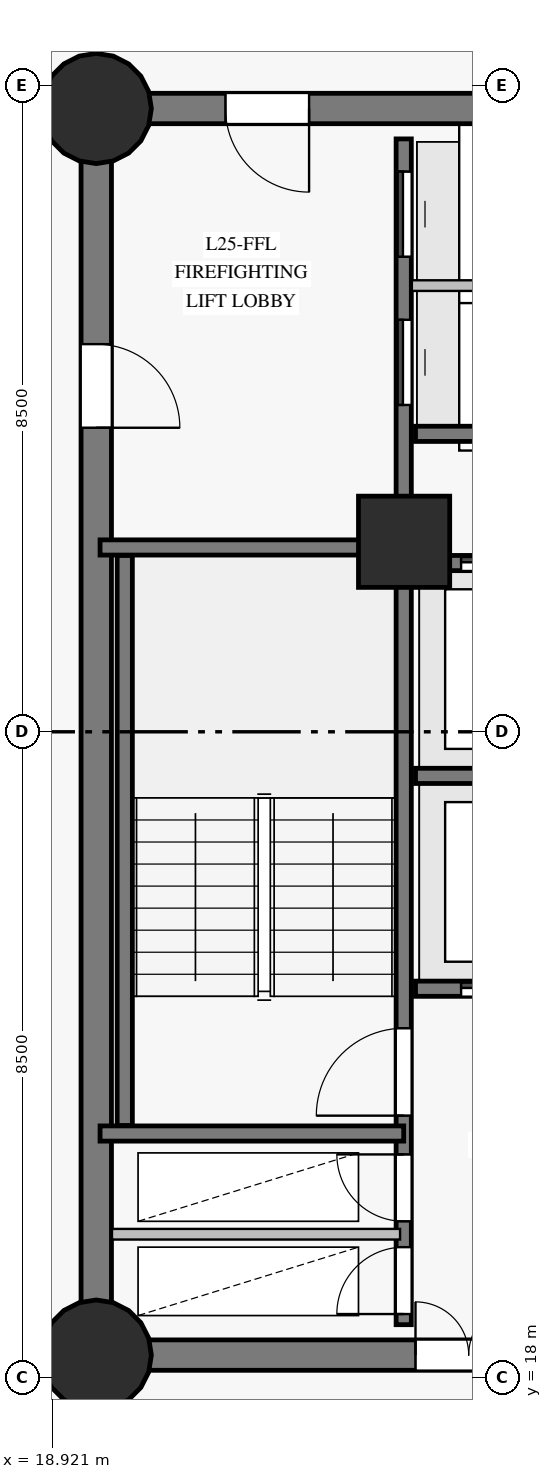
"""IFC4 building model, lengths in metres.
Left out: names, types, materials, properties, quantities, classifications, styles, units other than length and angle.
Written with IfcOpenShell. Run it as: python <this file> out.ifc"""

import sys

from ifc_helpers import new_model, si_unit, direction, frame, frame_2d, origin, origin_with_axes, origin_2d, place, context, subcontext, project, spatial, rectangle, circle, extrude, source, transform, mapped, element, fill, save


model = new_model("IFC4")
c1 = context("Model", 3, precision=1e-05, world=origin(), true_north=direction((0.0, 1.0)))
c2 = subcontext(c1, "Body", "Model", "MODEL_VIEW")
j1 = project(units=[si_unit("LENGTHUNIT", "METRE"), si_unit("PLANEANGLEUNIT", "RADIAN")], contexts=[c1])
p1 = place(None, origin())
s1 = spatial("IfcSite", under=j1, at=p1, CompositionType="ELEMENT")
p2 = place(p1, origin())
s2 = spatial("IfcBuilding", under=s1, at=p2, CompositionType="ELEMENT")
p3 = place(p2, frame((0.0, 0.0, 96.2)))
s3 = spatial("IfcBuildingStorey", under=s2, at=p3, CompositionType="ELEMENT", Elevation=96.2)
p4 = place(p3, frame((19.5, 18.3, 0.0), z_axis=(0.0, 0.0, 1.0), x_axis=(1.0, 0.0, 0.0)))
e1 = element("IfcWall", 1, at=p4, inside=s3, PredefinedType="SHEAR", context=c2, shape_type="SweptSolid", body=[
    extrude(rectangle(XDim=7.05, YDim=0.4, at=frame_2d((3.525, 0.0))), origin(), (0.0, 0.0, 1.0), 2.825),
])
p5 = place(p4, frame((4.2, 0.0, 0.0)))
e2 = element("IfcOpeningElement", 2, at=p5, cuts=e1, PredefinedType="OPENING", context=c2, shape_type="SweptSolid", body=[
    extrude(rectangle(XDim=1.4, YDim=2.2, at=frame_2d((0.7, 1.1))), frame((0.0, 0.21, 0.0), z_axis=(0.0, -1.0, 0.0), x_axis=(1.0, 0.0, 0.0)), (0.0, 0.0, 1.0), 0.42),
])
p6 = place(p3, frame((26.55, 34.7, 0.0), z_axis=(0.0, 0.0, 1.0), x_axis=(-1.0, 0.0, 0.0)))
e3 = element("IfcWall", 3, at=p6, inside=s3, PredefinedType="SHEAR", context=c2, shape_type="SweptSolid", body=[
    extrude(rectangle(XDim=7.05, YDim=0.4, at=frame_2d((3.525, 0.0))), origin(), (0.0, 0.0, 1.0), 2.825),
])
p7 = place(p6, frame((4.25, 0.0, 0.0)))
e4 = element("IfcOpeningElement", 4, at=p7, cuts=e3, PredefinedType="OPENING", context=c2, shape_type="SweptSolid", body=[
    extrude(rectangle(XDim=1.1, YDim=2.15, at=frame_2d((0.55, 1.075))), frame((0.0, 0.21, 0.0), z_axis=(0.0, -1.0, 0.0), x_axis=(1.0, 0.0, 0.0)), (0.0, 0.0, 1.0), 0.42),
])
p8 = place(p3, frame((19.5, 34.7, 0.0), z_axis=(0.0, 0.0, 1.0), x_axis=(0.0, -1.0, 0.0)))
e5 = element("IfcWall", 5, at=p8, inside=s3, PredefinedType="SHEAR", context=c2, shape_type="SweptSolid", body=[
    extrude(rectangle(XDim=16.4, YDim=0.4, at=frame_2d((8.2, 0.0))), origin(), (0.0, 0.0, 1.0), 2.825),
])
p9 = place(p8, frame((3.1, 0.0, 0.0)))
e6 = element("IfcOpeningElement", 6, at=p9, cuts=e5, PredefinedType="OPENING", context=c2, shape_type="SweptSolid", body=[
    extrude(rectangle(XDim=1.1, YDim=2.15, at=frame_2d((0.55, 1.075))), frame((0.0, 0.21, 0.0), z_axis=(0.0, -1.0, 0.0), x_axis=(1.0, 0.0, 0.0)), (0.0, 0.0, 1.0), 0.42),
])
m1 = source(origin_with_axes(), c2, "Body", "SweptSolid", [
    extrude(circle(Radius=0.725, at=origin_2d()), origin(), (0.0, 0.0, 1.0), 3.05),
])
for number, where, z_axis, x_axis in (
    (7, (19.5, 18.3, 0.0), (0.0, 0.0, 1.0), (1.0, 0.0, 0.0)),
    (8, (19.5, 34.7, 0.0), (0.0, 0.0, 1.0), (1.0, 0.0, 0.0)),
):
    element("IfcColumn", number, at=place(p3, frame(where, z_axis=z_axis, x_axis=x_axis)), inside=s3, PredefinedType="COLUMN", context=c2, shape_type="MappedRepresentation", body=[
        mapped(m1, transform((0.0, 0.0, 0.0), scale=1.0)),
    ])
m2 = source(origin_with_axes(), c2, "Body", "SweptSolid", [
    extrude(rectangle(XDim=1.2, YDim=1.2, at=origin_2d()), origin(), (0.0, 0.0, 1.0), 3.05),
])
p10 = place(p3, frame((23.55, 29.0, 0.0), z_axis=(0.0, 0.0, 1.0), x_axis=(1.0, 0.0, 0.0)))
e9 = element("IfcColumn", 9, at=p10, inside=s3, PredefinedType="COLUMN", context=c2, shape_type="MappedRepresentation", body=[
    mapped(m2, transform((0.0, 0.0, 0.0), scale=1.0)),
])
p11 = place(p3, frame((21.66, 46.74, 0.0), z_axis=(0.0, 0.0, 1.0), x_axis=(-0.603487207486, -0.797372679743, 0.0)))
e10 = element("IfcWall", 10, at=p11, inside=s3, PredefinedType="SOLIDWALL", context=c2, shape_type="SweptSolid", body=[
    extrude(rectangle(XDim=24.022, YDim=0.32, at=frame_2d((12.011, 0.0))), origin(), (0.0, 0.0, 1.0), 2.825),
])
p12 = place(p11, frame((1.101, 0.0, 0.85)))
e11 = element("IfcOpeningElement", 11, at=p12, cuts=e10, PredefinedType="OPENING", context=c2, shape_type="SweptSolid", body=[
    extrude(rectangle(XDim=1.65, YDim=1.65, at=frame_2d((0.825, 0.825))), frame((0.0, 0.17, 0.0), z_axis=(0.0, -1.0, 0.0), x_axis=(1.0, 0.0, 0.0)), (0.0, 0.0, 1.0), 0.34),
])
p13 = place(p11, frame((5.462, 0.0, 0.85)))
e12 = element("IfcOpeningElement", 12, at=p13, cuts=e10, PredefinedType="OPENING", context=c2, shape_type="SweptSolid", body=[
    extrude(rectangle(XDim=1.65, YDim=1.65, at=frame_2d((0.825, 0.825))), frame((0.0, 0.17, 0.0), z_axis=(0.0, -1.0, 0.0), x_axis=(1.0, 0.0, 0.0)), (0.0, 0.0, 1.0), 0.34),
])
p14 = place(p11, frame((15.427, 0.0, 0.85)))
e13 = element("IfcOpeningElement", 13, at=p14, cuts=e10, PredefinedType="OPENING", context=c2, shape_type="SweptSolid", body=[
    extrude(rectangle(XDim=1.65, YDim=1.65, at=frame_2d((0.825, 0.825))), frame((0.0, 0.17, 0.0), z_axis=(0.0, -1.0, 0.0), x_axis=(1.0, 0.0, 0.0)), (0.0, 0.0, 1.0), 0.34),
])
p15 = place(p11, frame((21.495, 0.0, 0.0)))
e14 = element("IfcOpeningElement", 14, at=p15, cuts=e10, PredefinedType="OPENING", context=c2, shape_type="SweptSolid", body=[
    extrude(rectangle(XDim=1.05, YDim=2.12, at=frame_2d((0.525, 1.06))), frame((0.0, 0.17, 0.0), z_axis=(0.0, -1.0, 0.0), x_axis=(1.0, 0.0, 0.0)), (0.0, 0.0, 1.0), 0.34),
])
p16 = place(p3, frame((23.545, 18.7, 0.0), z_axis=(0.0, 0.0, 1.0), x_axis=(0.0, 1.0, 0.0)))
e15 = element("IfcWall", 15, at=p16, inside=s3, PredefinedType="SHEAR", context=c2, shape_type="SweptSolid", body=[
    extrude(rectangle(XDim=15.6, YDim=0.2, at=frame_2d((7.8, 0.0))), origin(), (0.0, 0.0, 1.0), 2.825),
])
p17 = place(p16, frame((2.75, 0.0, 0.0)))
e16 = element("IfcOpeningElement", 16, at=p17, cuts=e15, PredefinedType="OPENING", context=c2, shape_type="SweptSolid", body=[
    extrude(rectangle(XDim=1.15, YDim=2.15, at=frame_2d((0.575, 1.075))), frame((0.0, 0.11, 0.0), z_axis=(0.0, -1.0, 0.0), x_axis=(1.0, 0.0, 0.0)), (0.0, 0.0, 1.0), 0.22),
])
p18 = place(p16, frame((0.14, 0.0, 0.0)))
e17 = element("IfcOpeningElement", 17, at=p18, cuts=e15, PredefinedType="OPENING", context=c2, shape_type="SweptSolid", body=[
    extrude(rectangle(XDim=0.88, YDim=2.1, at=frame_2d((0.44, 1.05))), frame((0.0, 0.11, 0.0), z_axis=(0.0, -1.0, 0.0), x_axis=(1.0, 0.0, 0.0)), (0.0, 0.0, 1.0), 0.22),
])
p19 = place(p16, frame((1.36, 0.0, 0.0)))
e18 = element("IfcOpeningElement", 18, at=p19, cuts=e15, PredefinedType="OPENING", context=c2, shape_type="SweptSolid", body=[
    extrude(rectangle(XDim=0.88, YDim=2.1, at=frame_2d((0.44, 1.05))), frame((0.0, 0.11, 0.0), z_axis=(0.0, -1.0, 0.0), x_axis=(1.0, 0.0, 0.0)), (0.0, 0.0, 1.0), 0.22),
])
p20 = place(p16, frame((12.1, 0.0, 0.0)))
e19 = element("IfcOpeningElement", 19, at=p20, cuts=e15, PredefinedType="OPENING", context=c2, shape_type="SweptSolid", body=[
    extrude(rectangle(XDim=1.12, YDim=2.15, at=frame_2d((0.56, 1.075))), frame((0.0, 0.11, 0.0), z_axis=(0.0, -1.0, 0.0), x_axis=(1.0, 0.0, 0.0)), (0.0, 0.0, 1.0), 0.22),
])
p21 = place(p16, frame((14.05, 0.0, 0.0)))
e20 = element("IfcOpeningElement", 20, at=p21, cuts=e15, PredefinedType="OPENING", context=c2, shape_type="SweptSolid", body=[
    extrude(rectangle(XDim=1.12, YDim=2.15, at=frame_2d((0.56, 1.075))), frame((0.0, 0.11, 0.0), z_axis=(0.0, -1.0, 0.0), x_axis=(1.0, 0.0, 0.0)), (0.0, 0.0, 1.0), 0.22),
])
p22 = place(p3, frame((23.7, 23.12, 0.0), z_axis=(0.0, 0.0, 1.0), x_axis=(1.0, 0.0, 0.0)))
e21 = element("IfcWall", 21, at=p22, inside=s3, PredefinedType="SHEAR", context=c2, shape_type="SweptSolid", body=[
    extrude(rectangle(XDim=9.6, YDim=0.2, at=frame_2d((4.8, 0.0))), origin(), (0.0, 0.0, 1.0), 2.825),
])
p23 = place(p22, frame((0.6, 0.0, 0.0)))
e22 = element("IfcOpeningElement", 22, at=p23, cuts=e21, PredefinedType="OPENING", context=c2, shape_type="SweptSolid", body=[
    extrude(rectangle(XDim=1.1, YDim=2.15, at=frame_2d((0.55, 1.075))), frame((0.0, 0.11, 0.0), z_axis=(0.0, -1.0, 0.0), x_axis=(1.0, 0.0, 0.0)), (0.0, 0.0, 1.0), 0.22),
])
p24 = place(p22, frame((2.98, 0.0, 0.0)))
e23 = element("IfcOpeningElement", 23, at=p24, cuts=e21, PredefinedType="OPENING", context=c2, shape_type="SweptSolid", body=[
    extrude(rectangle(XDim=1.1, YDim=2.15, at=frame_2d((0.55, 1.075))), frame((0.0, 0.11, 0.0), z_axis=(0.0, -1.0, 0.0), x_axis=(1.0, 0.0, 0.0)), (0.0, 0.0, 1.0), 0.22),
])
p25 = place(p22, frame((5.36, 0.0, 0.0)))
e24 = element("IfcOpeningElement", 24, at=p25, cuts=e21, PredefinedType="OPENING", context=c2, shape_type="SweptSolid", body=[
    extrude(rectangle(XDim=1.1, YDim=2.15, at=frame_2d((0.55, 1.075))), frame((0.0, 0.11, 0.0), z_axis=(0.0, -1.0, 0.0), x_axis=(1.0, 0.0, 0.0)), (0.0, 0.0, 1.0), 0.22),
])
p26 = place(p22, frame((7.74, 0.0, 0.0)))
e25 = element("IfcOpeningElement", 25, at=p26, cuts=e21, PredefinedType="OPENING", context=c2, shape_type="SweptSolid", body=[
    extrude(rectangle(XDim=1.1, YDim=2.15, at=frame_2d((0.55, 1.075))), frame((0.0, 0.11, 0.0), z_axis=(0.0, -1.0, 0.0), x_axis=(1.0, 0.0, 0.0)), (0.0, 0.0, 1.0), 0.22),
])
p27 = place(p3, frame((23.7, 25.92, 0.0), z_axis=(0.0, 0.0, 1.0), x_axis=(1.0, 0.0, 0.0)))
e26 = element("IfcWall", 26, at=p27, inside=s3, PredefinedType="SHEAR", context=c2, shape_type="SweptSolid", body=[
    extrude(rectangle(XDim=9.6, YDim=0.2, at=frame_2d((4.8, 0.0))), origin(), (0.0, 0.0, 1.0), 2.825),
])
p28 = place(p3, frame((23.7, 28.72, 0.0), z_axis=(0.0, 0.0, 1.0), x_axis=(1.0, 0.0, 0.0)))
e27 = element("IfcWall", 27, at=p28, inside=s3, PredefinedType="SHEAR", context=c2, shape_type="SweptSolid", body=[
    extrude(rectangle(XDim=9.6, YDim=0.2, at=frame_2d((4.8, 0.0))), origin(), (0.0, 0.0, 1.0), 2.825),
])
p29 = place(p28, frame((0.6, 0.0, 0.0)))
e28 = element("IfcOpeningElement", 28, at=p29, cuts=e27, PredefinedType="OPENING", context=c2, shape_type="SweptSolid", body=[
    extrude(rectangle(XDim=1.1, YDim=2.15, at=frame_2d((0.55, 1.075))), frame((0.0, 0.11, 0.0), z_axis=(0.0, -1.0, 0.0), x_axis=(1.0, 0.0, 0.0)), (0.0, 0.0, 1.0), 0.22),
])
p30 = place(p28, frame((2.98, 0.0, 0.0)))
e29 = element("IfcOpeningElement", 29, at=p30, cuts=e27, PredefinedType="OPENING", context=c2, shape_type="SweptSolid", body=[
    extrude(rectangle(XDim=1.1, YDim=2.15, at=frame_2d((0.55, 1.075))), frame((0.0, 0.11, 0.0), z_axis=(0.0, -1.0, 0.0), x_axis=(1.0, 0.0, 0.0)), (0.0, 0.0, 1.0), 0.22),
])
p31 = place(p28, frame((5.36, 0.0, 0.0)))
e30 = element("IfcOpeningElement", 30, at=p31, cuts=e27, PredefinedType="OPENING", context=c2, shape_type="SweptSolid", body=[
    extrude(rectangle(XDim=1.1, YDim=2.15, at=frame_2d((0.55, 1.075))), frame((0.0, 0.11, 0.0), z_axis=(0.0, -1.0, 0.0), x_axis=(1.0, 0.0, 0.0)), (0.0, 0.0, 1.0), 0.22),
])
p32 = place(p28, frame((7.74, 0.0, 0.0)))
e31 = element("IfcOpeningElement", 31, at=p32, cuts=e27, PredefinedType="OPENING", context=c2, shape_type="SweptSolid", body=[
    extrude(rectangle(XDim=1.1, YDim=2.15, at=frame_2d((0.55, 1.075))), frame((0.0, 0.11, 0.0), z_axis=(0.0, -1.0, 0.0), x_axis=(1.0, 0.0, 0.0)), (0.0, 0.0, 1.0), 0.22),
])
p33 = place(p3, frame((19.875, 21.32, 0.0), z_axis=(0.0, 0.0, 1.0), x_axis=(0.0, 1.0, 0.0)))
e32 = element("IfcWall", 32, at=p33, inside=s3, PredefinedType="SHEAR", context=c2, shape_type="SweptSolid", body=[
    extrude(rectangle(XDim=7.5, YDim=0.2, at=frame_2d((3.75, 0.0))), origin(), (0.0, 0.0, 1.0), 2.825),
])
for number, where, z_axis, x_axis in (
    (33, (19.55, 21.215, 0.0), (0.0, 0.0, 1.0), (1.0, 0.0, 0.0)),
    (34, (19.55, 28.925, 0.0), (0.0, 0.0, 1.0), (1.0, 0.0, 0.0)),
):
    element("IfcWall", number, at=place(p3, frame(where, z_axis=z_axis, x_axis=x_axis)), inside=s3, PredefinedType="SHEAR", context=c2, shape_type="SweptSolid", body=[
        extrude(rectangle(XDim=3.995, YDim=0.2, at=frame_2d((1.998, 0.0))), origin(), (0.0, 0.0, 1.0), 2.825),
    ])
p34 = place(p3, frame((23.7, 30.42, 0.0), z_axis=(0.0, 0.0, 1.0), x_axis=(1.0, 0.0, 0.0)))
e35 = element("IfcWall", 35, at=p34, inside=s3, PredefinedType="SHEAR", context=c2, shape_type="SweptSolid", body=[
    extrude(rectangle(XDim=2.78, YDim=0.2, at=frame_2d((1.39, 0.0))), origin(), (0.0, 0.0, 1.0), 2.825),
])
p35 = place(p3, frame((19.707, 19.89, 0.0), z_axis=(0.0, 0.0, 1.0), x_axis=(1.0, 0.0, 0.0)))
e36 = element("IfcWall", 36, at=p35, inside=s3, PredefinedType="PARTITIONING", context=c2, shape_type="SweptSolid", body=[
    extrude(rectangle(XDim=3.79, YDim=0.14, at=frame_2d((1.895, 0.0))), origin(), (0.0, 0.0, 1.0), 2.825),
])
p36 = place(p3, frame((23.652, 32.37, 0.0), z_axis=(0.0, 0.0, 1.0), x_axis=(1.0, 0.0, 0.0)))
e37 = element("IfcWall", 37, at=p36, inside=s3, PredefinedType="PARTITIONING", context=c2, shape_type="SweptSolid", body=[
    extrude(rectangle(XDim=2.828, YDim=0.14, at=frame_2d((1.414, 0.0))), origin(), (0.0, 0.0, 1.0), 2.825),
])
m3 = source(origin_with_axes(), c2, "Body", "SweptSolid", [
    extrude(rectangle(XDim=1.15, YDim=2.15, at=frame_2d((0.575, 1.075))), frame((0.0, 0.025, 0.0), z_axis=(0.0, -1.0, 0.0), x_axis=(1.0, 0.0, 0.0)), (0.0, 0.0, 1.0), 0.05),
])
p37 = place(p17, origin())
e38 = element("IfcDoor", 38, at=p37, inside=s3, OperationType="SINGLE_SWING_LEFT", PredefinedType="DOOR", context=c2, shape_type="MappedRepresentation", body=[
    mapped(m3, transform((0.0, 0.0, 0.0), scale=1.0)),
])
fill(e16, e38)
m4 = source(origin_with_axes(), c2, "Body", "SweptSolid", [
    extrude(rectangle(XDim=1.1, YDim=2.15, at=frame_2d((0.55, 1.075))), frame((0.0, 0.025, 0.0), z_axis=(0.0, -1.0, 0.0), x_axis=(1.0, 0.0, 0.0)), (0.0, 0.0, 1.0), 0.05),
])
p38 = place(p7, origin())
e39 = element("IfcDoor", 39, at=p38, inside=s3, OperationType="SINGLE_SWING_LEFT", PredefinedType="DOOR", context=c2, shape_type="MappedRepresentation", body=[
    mapped(m4, transform((0.0, 0.0, 0.0), scale=1.0)),
])
fill(e4, e39)
p39 = place(p9, origin())
e40 = element("IfcDoor", 40, at=p39, inside=s3, OperationType="SINGLE_SWING_RIGHT", PredefinedType="DOOR", context=c2, shape_type="MappedRepresentation", body=[
    mapped(m4, transform((0.0, 0.0, 0.0), scale=1.0)),
])
fill(e6, e40)
m5 = source(origin_with_axes(), c2, "Body", "SweptSolid", [
    extrude(rectangle(XDim=0.88, YDim=2.1, at=frame_2d((0.44, 1.05))), frame((0.0, 0.025, 0.0), z_axis=(0.0, -1.0, 0.0), x_axis=(1.0, 0.0, 0.0)), (0.0, 0.0, 1.0), 0.05),
])
p40 = place(p18, origin())
e41 = element("IfcDoor", 41, at=p40, inside=s3, OperationType="SINGLE_SWING_LEFT", PredefinedType="DOOR", context=c2, shape_type="MappedRepresentation", body=[
    mapped(m5, transform((0.0, 0.0, 0.0), scale=1.0)),
])
fill(e17, e41)
p41 = place(p19, origin())
e42 = element("IfcDoor", 42, at=p41, inside=s3, OperationType="SINGLE_SWING_RIGHT", PredefinedType="DOOR", context=c2, shape_type="MappedRepresentation", body=[
    mapped(m5, transform((0.0, 0.0, 0.0), scale=1.0)),
])
fill(e18, e42)
m6 = source(origin_with_axes(), c2, "Body", "SweptSolid", [
    extrude(rectangle(XDim=1.4, YDim=2.2, at=frame_2d((0.7, 1.1))), frame((0.0, 0.025, 0.0), z_axis=(0.0, -1.0, 0.0), x_axis=(1.0, 0.0, 0.0)), (0.0, 0.0, 1.0), 0.05),
])
p42 = place(p5, origin())
e43 = element("IfcDoor", 43, at=p42, inside=s3, OperationType="DOUBLE_DOOR_SINGLE_SWING", PredefinedType="DOOR", context=c2, shape_type="MappedRepresentation", body=[
    mapped(m6, transform((0.0, 0.0, 0.0), scale=1.0)),
])
fill(e2, e43)
p43 = place(p23, origin())
e44 = element("IfcDoor", 44, at=p43, inside=s3, OperationType="SLIDING_TO_LEFT", PredefinedType="DOOR", context=c2, shape_type="MappedRepresentation", body=[
    mapped(m4, transform((0.0, 0.0, 0.0), scale=1.0)),
])
fill(e22, e44)
p44 = place(p29, origin())
e45 = element("IfcDoor", 45, at=p44, inside=s3, OperationType="SLIDING_TO_LEFT", PredefinedType="DOOR", context=c2, shape_type="MappedRepresentation", body=[
    mapped(m4, transform((0.0, 0.0, 0.0), scale=1.0)),
])
fill(e28, e45)
m7 = source(origin_with_axes(), c2, "Body", "SweptSolid", [
    extrude(rectangle(XDim=1.12, YDim=2.15, at=frame_2d((0.56, 1.075))), frame((0.0, 0.025, 0.0), z_axis=(0.0, -1.0, 0.0), x_axis=(1.0, 0.0, 0.0)), (0.0, 0.0, 1.0), 0.05),
])
p45 = place(p20, origin())
e46 = element("IfcDoor", 46, at=p45, inside=s3, OperationType="SLIDING_TO_LEFT", PredefinedType="DOOR", context=c2, shape_type="MappedRepresentation", body=[
    mapped(m7, transform((0.0, 0.0, 0.0), scale=1.0)),
])
fill(e19, e46)
p46 = place(p21, origin())
e47 = element("IfcDoor", 47, at=p46, inside=s3, OperationType="SLIDING_TO_RIGHT", PredefinedType="DOOR", context=c2, shape_type="MappedRepresentation", body=[
    mapped(m7, transform((0.0, 0.0, 0.0), scale=1.0)),
])
fill(e20, e47)
save(model, sys.argv[1])
